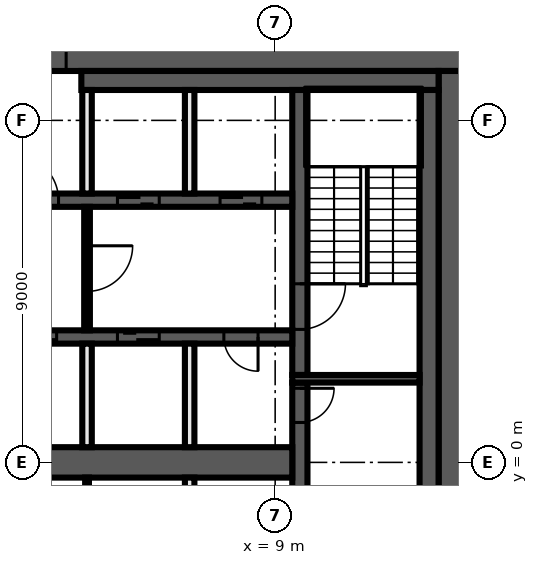
"""IFC4 building model, lengths in metres.
Left out: names, types, materials, properties, quantities, classifications, styles, units other than length and angle.
Written with IfcOpenShell. Run it as: python <this file> out.ifc"""

import sys

from ifc_helpers import new_model, si_unit, direction, frame, frame_2d, origin, place, context, subcontext, project, spatial, rectangle, extrude, element, fill, save


model = new_model("IFC4")
c1 = context("Model", 3, precision=1e-05, world=origin(), true_north=direction((0.0, 1.0)))
c2 = subcontext(c1, "Body", "Model", "MODEL_VIEW")
j1 = project(units=[si_unit("LENGTHUNIT", "METRE"), si_unit("PLANEANGLEUNIT", "RADIAN")], contexts=[c1])
p1 = place(None, origin())
s1 = spatial("IfcSite", under=j1, at=p1, CompositionType="ELEMENT")
p2 = place(p1, origin())
s2 = spatial("IfcBuilding", under=s1, at=p2, CompositionType="ELEMENT")
p3 = place(p2, frame((0.0, 0.0, 228.6)))
s3 = spatial("IfcBuildingStorey", under=s2, at=p3, CompositionType="ELEMENT", Elevation=228.6)
p4 = place(p3, frame((-14.0, 10.65, 0.0), z_axis=(0.0, 0.0, 1.0), x_axis=(1.0, 0.0, 0.0)))
e1 = element("IfcWall", 1, at=p4, inside=s3, PredefinedType="SHEAR", context=c2, shape_type="SweptSolid", body=[
    extrude(rectangle(XDim=28.0, YDim=0.7, at=frame_2d((14.0, 0.0))), origin(), (0.0, 0.0, 1.0), 3.75),
])
p5 = place(p4, frame((15.9, 0.0, 0.0)))
e2 = element("IfcOpeningElement", 2, at=p5, cuts=e1, PredefinedType="OPENING", context=c2, shape_type="SweptSolid", body=[
    extrude(rectangle(XDim=1.6, YDim=2.1, at=frame_2d((0.8, 1.05))), frame((0.0, 0.36, 0.0), z_axis=(0.0, -1.0, 0.0), x_axis=(1.0, 0.0, 0.0)), (0.0, 0.0, 1.0), 0.72),
])
p6 = place(p3, frame((13.65, 10.3, 0.0), z_axis=(0.0, 0.0, 1.0), x_axis=(0.0, -1.0, 0.0)))
e3 = element("IfcWall", 3, at=p6, inside=s3, PredefinedType="SHEAR", context=c2, shape_type="SweptSolid", body=[
    extrude(rectangle(XDim=20.6, YDim=0.7, at=frame_2d((10.3, 0.0))), origin(), (0.0, 0.0, 1.0), 3.75),
])
p7 = place(p3, frame((3.9, 10.05, 0.0), z_axis=(0.0, 0.0, 1.0), x_axis=(1.0, 0.0, 0.0)))
e4 = element("IfcWall", 4, at=p7, inside=s3, PredefinedType="SHEAR", context=c2, shape_type="SweptSolid", body=[
    extrude(rectangle(XDim=9.4, YDim=0.5, at=frame_2d((4.7, 0.0))), origin(), (0.0, 0.0, 1.0), 3.75),
])
p8 = place(p3, frame((13.05, 9.8, 0.0), z_axis=(0.0, 0.0, 1.0), x_axis=(0.0, -1.0, 0.0)))
e5 = element("IfcWall", 5, at=p8, inside=s3, PredefinedType="SHEAR", context=c2, shape_type="SweptSolid", body=[
    extrude(rectangle(XDim=19.6, YDim=0.5, at=frame_2d((9.8, 0.0))), origin(), (0.0, 0.0, 1.0), 3.75),
])
p9 = place(p3, frame((9.65, 2.1, 0.0), z_axis=(0.0, 0.0, 1.0), x_axis=(0.0, -1.0, 0.0)))
e6 = element("IfcWall", 6, at=p9, inside=s3, PredefinedType="SHEAR", context=c2, shape_type="SweptSolid", body=[
    extrude(rectangle(XDim=4.2, YDim=0.4, at=frame_2d((2.1, 0.0))), origin(), (0.0, 0.0, 1.0), 3.75),
])
p10 = place(p9, frame((0.15, 0.0, 0.0)))
e7 = element("IfcOpeningElement", 7, at=p10, cuts=e6, PredefinedType="OPENING", context=c2, shape_type="SweptSolid", body=[
    extrude(rectangle(XDim=0.9, YDim=2.1, at=frame_2d((0.45, 1.05))), frame((0.0, 0.21, 0.0), z_axis=(0.0, -1.0, 0.0), x_axis=(1.0, 0.0, 0.0)), (0.0, 0.0, 1.0), 0.42),
])
p11 = place(p3, frame((9.65, 9.8, 0.0), z_axis=(0.0, 0.0, 1.0), x_axis=(0.0, -1.0, 0.0)))
e8 = element("IfcWall", 8, at=p11, inside=s3, PredefinedType="SHEAR", context=c2, shape_type="SweptSolid", body=[
    extrude(rectangle(XDim=7.5, YDim=0.4, at=frame_2d((3.75, 0.0))), origin(), (0.0, 0.0, 1.0), 3.75),
])
p12 = place(p11, frame((5.1, 0.0, 0.0)))
e9 = element("IfcOpeningElement", 9, at=p12, cuts=e8, PredefinedType="OPENING", context=c2, shape_type="SweptSolid", body=[
    extrude(rectangle(XDim=1.2, YDim=2.1, at=frame_2d((0.6, 1.05))), frame((0.0, 0.21, 0.0), z_axis=(0.0, -1.0, 0.0), x_axis=(1.0, 0.0, 0.0)), (0.0, 0.0, 1.0), 0.42),
])
p13 = place(p3, frame((9.45, 2.2, 0.0), z_axis=(0.0, 0.0, 1.0), x_axis=(1.0, 0.0, 0.0)))
e10 = element("IfcWall", 10, at=p13, inside=s3, PredefinedType="SHEAR", context=c2, shape_type="SweptSolid", body=[
    extrude(rectangle(XDim=3.35, YDim=0.2, at=frame_2d((1.675, 0.0))), origin(), (0.0, 0.0, 1.0), 3.75),
])
p14 = place(p3, frame((-9.45, 6.9, 0.0), z_axis=(0.0, 0.0, 1.0), x_axis=(1.0, 0.0, 0.0)))
e11 = element("IfcWall", 11, at=p14, inside=s3, PredefinedType="SHEAR", context=c2, shape_type="SweptSolid", body=[
    extrude(rectangle(XDim=18.9, YDim=0.35, at=frame_2d((9.45, 0.0))), origin(), (0.0, 0.0, 1.0), 3.75),
])
p15 = place(p14, frame((11.55, 0.0, 0.0)))
e12 = element("IfcOpeningElement", 12, at=p15, cuts=e11, PredefinedType="OPENING", context=c2, shape_type="SweptSolid", body=[
    extrude(rectangle(XDim=1.2, YDim=2.1, at=frame_2d((0.6, 1.05))), frame((0.0, 0.185, 0.0), z_axis=(0.0, -1.0, 0.0), x_axis=(1.0, 0.0, 0.0)), (0.0, 0.0, 1.0), 0.37),
])
p16 = place(p14, frame((14.3, 0.0, 0.0)))
e13 = element("IfcOpeningElement", 13, at=p16, cuts=e11, PredefinedType="OPENING", context=c2, shape_type="SweptSolid", body=[
    extrude(rectangle(XDim=1.1, YDim=2.1, at=frame_2d((0.55, 1.05))), frame((0.0, 0.185, 0.0), z_axis=(0.0, -1.0, 0.0), x_axis=(1.0, 0.0, 0.0)), (0.0, 0.0, 1.0), 0.37),
])
p17 = place(p14, frame((17.0, 0.0, 0.0)))
e14 = element("IfcOpeningElement", 14, at=p17, cuts=e11, PredefinedType="OPENING", context=c2, shape_type="SweptSolid", body=[
    extrude(rectangle(XDim=1.1, YDim=2.1, at=frame_2d((0.55, 1.05))), frame((0.0, 0.185, 0.0), z_axis=(0.0, -1.0, 0.0), x_axis=(1.0, 0.0, 0.0)), (0.0, 0.0, 1.0), 0.37),
])
p18 = place(p14, frame((2.25, 0.0, 0.0)))
e15 = element("IfcOpeningElement", 15, at=p18, cuts=e11, PredefinedType="OPENING", context=c2, shape_type="SweptSolid", body=[
    extrude(rectangle(XDim=0.9, YDim=2.1, at=frame_2d((0.45, 1.05))), frame((0.0, 0.185, 0.0), z_axis=(0.0, -1.0, 0.0), x_axis=(1.0, 0.0, 0.0)), (0.0, 0.0, 1.0), 0.37),
])
p19 = place(p14, frame((7.65, 0.0, 0.0)))
e16 = element("IfcOpeningElement", 16, at=p19, cuts=e11, PredefinedType="OPENING", context=c2, shape_type="SweptSolid", body=[
    extrude(rectangle(XDim=0.9, YDim=2.1, at=frame_2d((0.45, 1.05))), frame((0.0, 0.185, 0.0), z_axis=(0.0, -1.0, 0.0), x_axis=(1.0, 0.0, 0.0)), (0.0, 0.0, 1.0), 0.37),
])
p20 = place(p3, frame((9.45, 3.3, 0.0), z_axis=(0.0, 0.0, 1.0), x_axis=(-1.0, 0.0, 0.0)))
e17 = element("IfcWall", 17, at=p20, inside=s3, PredefinedType="SHEAR", context=c2, shape_type="SweptSolid", body=[
    extrude(rectangle(XDim=18.9, YDim=0.35, at=frame_2d((9.45, 0.0))), origin(), (0.0, 0.0, 1.0), 3.75),
])
p21 = place(p20, frame((6.2, 0.0, 0.0)))
e18 = element("IfcOpeningElement", 18, at=p21, cuts=e17, PredefinedType="OPENING", context=c2, shape_type="SweptSolid", body=[
    extrude(rectangle(XDim=1.1, YDim=2.1, at=frame_2d((0.55, 1.05))), frame((0.0, 0.185, 0.0), z_axis=(0.0, -1.0, 0.0), x_axis=(1.0, 0.0, 0.0)), (0.0, 0.0, 1.0), 0.37),
])
p22 = place(p20, frame((3.5, 0.0, 0.0)))
e19 = element("IfcOpeningElement", 19, at=p22, cuts=e17, PredefinedType="OPENING", context=c2, shape_type="SweptSolid", body=[
    extrude(rectangle(XDim=1.1, YDim=2.1, at=frame_2d((0.55, 1.05))), frame((0.0, 0.185, 0.0), z_axis=(0.0, -1.0, 0.0), x_axis=(1.0, 0.0, 0.0)), (0.0, 0.0, 1.0), 0.37),
])
p23 = place(p20, frame((0.9, 0.0, 0.0)))
e20 = element("IfcOpeningElement", 20, at=p23, cuts=e17, PredefinedType="OPENING", context=c2, shape_type="SweptSolid", body=[
    extrude(rectangle(XDim=0.9, YDim=2.1, at=frame_2d((0.45, 1.05))), frame((0.0, 0.185, 0.0), z_axis=(0.0, -1.0, 0.0), x_axis=(1.0, 0.0, 0.0)), (0.0, 0.0, 1.0), 0.37),
])
p24 = place(p20, frame((17.1, 0.0, 0.0)))
e21 = element("IfcOpeningElement", 21, at=p24, cuts=e17, PredefinedType="OPENING", context=c2, shape_type="SweptSolid", body=[
    extrude(rectangle(XDim=0.9, YDim=2.1, at=frame_2d((0.45, 1.05))), frame((0.0, 0.185, 0.0), z_axis=(0.0, -1.0, 0.0), x_axis=(1.0, 0.0, 0.0)), (0.0, 0.0, 1.0), 0.37),
])
p25 = place(p20, frame((14.4, 0.0, 0.0)))
e22 = element("IfcOpeningElement", 22, at=p25, cuts=e17, PredefinedType="OPENING", context=c2, shape_type="SweptSolid", body=[
    extrude(rectangle(XDim=0.9, YDim=2.1, at=frame_2d((0.45, 1.05))), frame((0.0, 0.185, 0.0), z_axis=(0.0, -1.0, 0.0), x_axis=(1.0, 0.0, 0.0)), (0.0, 0.0, 1.0), 0.37),
])
p26 = place(p20, frame((11.7, 0.0, 0.0)))
e23 = element("IfcOpeningElement", 23, at=p26, cuts=e17, PredefinedType="OPENING", context=c2, shape_type="SweptSolid", body=[
    extrude(rectangle(XDim=0.9, YDim=2.1, at=frame_2d((0.45, 1.05))), frame((0.0, 0.185, 0.0), z_axis=(0.0, -1.0, 0.0), x_axis=(1.0, 0.0, 0.0)), (0.0, 0.0, 1.0), 0.37),
])
p27 = place(p20, frame((9.0, 0.0, 0.0)))
e24 = element("IfcOpeningElement", 24, at=p27, cuts=e17, PredefinedType="OPENING", context=c2, shape_type="SweptSolid", body=[
    extrude(rectangle(XDim=0.9, YDim=2.1, at=frame_2d((0.45, 1.05))), frame((0.0, 0.185, 0.0), z_axis=(0.0, -1.0, 0.0), x_axis=(1.0, 0.0, 0.0)), (0.0, 0.0, 1.0), 0.37),
])
p28 = place(p3, frame((-9.45, 0.0, 0.0), z_axis=(0.0, 0.0, 1.0), x_axis=(1.0, 0.0, 0.0)))
e25 = element("IfcWall", 25, at=p28, inside=s3, PredefinedType="SHEAR", context=c2, shape_type="SweptSolid", body=[
    extrude(rectangle(XDim=18.9, YDim=0.8, at=frame_2d((9.45, 0.0))), origin(), (0.0, 0.0, 1.0), 3.75),
])
for number, where, z_axis, x_axis in (
    (26, (6.75, -3.125, 0.0), (0.0, 0.0, 1.0), (0.0, 1.0, 0.0)),
    (27, (6.75, 0.4, 0.0), (0.0, 0.0, 1.0), (0.0, 1.0, 0.0)),
    (28, (6.75, 7.075, 0.0), (0.0, 0.0, 1.0), (0.0, 1.0, 0.0)),
):
    element("IfcWall", number, at=place(p3, frame(where, z_axis=z_axis, x_axis=x_axis)), inside=s3, PredefinedType="SOLIDWALL", context=c2, shape_type="SweptSolid", body=[
        extrude(rectangle(XDim=2.725, YDim=0.25, at=frame_2d((1.363, 0.0))), origin(), (0.0, 0.0, 1.0), 3.75),
    ])
p29 = place(p3, frame((4.05, 6.725, 0.0), z_axis=(0.0, 0.0, 1.0), x_axis=(0.0, -1.0, 0.0)))
e29 = element("IfcWall", 29, at=p29, inside=s3, PredefinedType="PARTITIONING", context=c2, shape_type="SweptSolid", body=[
    extrude(rectangle(XDim=3.25, YDim=0.15, at=frame_2d((1.625, 0.0))), origin(), (0.0, 0.0, 1.0), 3.75),
])
p30 = place(p29, frame((1.025, 0.0, 0.0)))
e30 = element("IfcOpeningElement", 30, at=p30, cuts=e29, PredefinedType="OPENING", context=c2, shape_type="SweptSolid", body=[
    extrude(rectangle(XDim=1.2, YDim=2.1, at=frame_2d((0.6, 1.05))), frame((0.0, 0.085, 0.0), z_axis=(0.0, -1.0, 0.0), x_axis=(1.0, 0.0, 0.0)), (0.0, 0.0, 1.0), 0.17),
])
p31 = place(p3, frame((4.05, -3.125, 0.0), z_axis=(0.0, 0.0, 1.0), x_axis=(0.0, 1.0, 0.0)))
e31 = element("IfcWall", 31, at=p31, inside=s3, PredefinedType="PARTITIONING", context=c2, shape_type="SweptSolid", body=[
    extrude(rectangle(XDim=2.725, YDim=0.1, at=frame_2d((1.363, 0.0))), origin(), (0.0, 0.0, 1.0), 3.75),
])
for number, where, z_axis, x_axis in (
    (32, (4.05, 0.4, 0.0), (0.0, 0.0, 1.0), (0.0, 1.0, 0.0)),
    (33, (4.05, 7.075, 0.0), (0.0, 0.0, 1.0), (0.0, 1.0, 0.0)),
):
    element("IfcWall", number, at=place(p3, frame(where, z_axis=z_axis, x_axis=x_axis)), inside=s3, PredefinedType="SOLIDWALL", context=c2, shape_type="SweptSolid", body=[
        extrude(rectangle(XDim=2.725, YDim=0.25, at=frame_2d((1.363, 0.0))), origin(), (0.0, 0.0, 1.0), 3.75),
    ])
p32 = place(p10, origin())
e34 = element("IfcDoor", 34, at=p32, inside=s3, OperationType="SINGLE_SWING_RIGHT", PredefinedType="DOOR", context=c2, shape_type="SweptSolid", body=[
    extrude(rectangle(XDim=0.9, YDim=2.1, at=frame_2d((0.45, 1.05))), frame((0.0, 0.025, 0.0), z_axis=(0.0, -1.0, 0.0), x_axis=(1.0, 0.0, 0.0)), (0.0, 0.0, 1.0), 0.05),
])
fill(e7, e34)
p33 = place(p5, origin())
e35 = element("IfcDoor", 35, at=p33, inside=s3, OperationType="DOUBLE_DOOR_SINGLE_SWING", PredefinedType="DOOR", context=c2, shape_type="SweptSolid", body=[
    extrude(rectangle(XDim=1.6, YDim=2.1, at=frame_2d((0.8, 1.05))), frame((0.0, 0.025, 0.0), z_axis=(0.0, -1.0, 0.0), x_axis=(1.0, 0.0, 0.0)), (0.0, 0.0, 1.0), 0.05),
])
fill(e2, e35)
p34 = place(p15, origin())
e36 = element("IfcDoor", 36, at=p34, inside=s3, OperationType="SINGLE_SWING_LEFT", PredefinedType="DOOR", context=c2, shape_type="SweptSolid", body=[
    extrude(rectangle(XDim=1.2, YDim=2.1, at=frame_2d((0.6, 1.05))), frame((0.0, 0.025, 0.0), z_axis=(0.0, -1.0, 0.0), x_axis=(1.0, 0.0, 0.0)), (0.0, 0.0, 1.0), 0.05),
])
fill(e12, e36)
p35 = place(p16, origin())
e37 = element("IfcDoor", 37, at=p35, inside=s3, OperationType="DOUBLE_DOOR_SLIDING", PredefinedType="DOOR", context=c2, shape_type="SweptSolid", body=[
    extrude(rectangle(XDim=1.1, YDim=2.1, at=frame_2d((0.55, 1.05))), frame((0.0, 0.025, 0.0), z_axis=(0.0, -1.0, 0.0), x_axis=(1.0, 0.0, 0.0)), (0.0, 0.0, 1.0), 0.05),
])
fill(e13, e37)
p36 = place(p17, origin())
e38 = element("IfcDoor", 38, at=p36, inside=s3, OperationType="DOUBLE_DOOR_SLIDING", PredefinedType="DOOR", context=c2, shape_type="SweptSolid", body=[
    extrude(rectangle(XDim=1.1, YDim=2.1, at=frame_2d((0.55, 1.05))), frame((0.0, 0.025, 0.0), z_axis=(0.0, -1.0, 0.0), x_axis=(1.0, 0.0, 0.0)), (0.0, 0.0, 1.0), 0.05),
])
fill(e14, e38)
p37 = place(p21, origin())
e39 = element("IfcDoor", 39, at=p37, inside=s3, OperationType="DOUBLE_DOOR_SLIDING", PredefinedType="DOOR", context=c2, shape_type="SweptSolid", body=[
    extrude(rectangle(XDim=1.1, YDim=2.1, at=frame_2d((0.55, 1.05))), frame((0.0, 0.025, 0.0), z_axis=(0.0, -1.0, 0.0), x_axis=(1.0, 0.0, 0.0)), (0.0, 0.0, 1.0), 0.05),
])
fill(e18, e39)
p38 = place(p22, origin())
e40 = element("IfcDoor", 40, at=p38, inside=s3, OperationType="DOUBLE_DOOR_SLIDING", PredefinedType="DOOR", context=c2, shape_type="SweptSolid", body=[
    extrude(rectangle(XDim=1.1, YDim=2.1, at=frame_2d((0.55, 1.05))), frame((0.0, 0.025, 0.0), z_axis=(0.0, -1.0, 0.0), x_axis=(1.0, 0.0, 0.0)), (0.0, 0.0, 1.0), 0.05),
])
fill(e19, e40)
p39 = place(p23, origin())
e41 = element("IfcDoor", 41, at=p39, inside=s3, OperationType="SINGLE_SWING_LEFT", PredefinedType="DOOR", context=c2, shape_type="SweptSolid", body=[
    extrude(rectangle(XDim=0.9, YDim=2.1, at=frame_2d((0.45, 1.05))), frame((0.0, 0.025, 0.0), z_axis=(0.0, -1.0, 0.0), x_axis=(1.0, 0.0, 0.0)), (0.0, 0.0, 1.0), 0.05),
])
fill(e20, e41)
p40 = place(p12, origin())
e42 = element("IfcDoor", 42, at=p40, inside=s3, OperationType="SINGLE_SWING_LEFT", PredefinedType="DOOR", context=c2, shape_type="SweptSolid", body=[
    extrude(rectangle(XDim=1.2, YDim=2.1, at=frame_2d((0.6, 1.05))), frame((0.0, 0.025, 0.0), z_axis=(0.0, -1.0, 0.0), x_axis=(1.0, 0.0, 0.0)), (0.0, 0.0, 1.0), 0.05),
])
fill(e9, e42)
p41 = place(p30, origin())
e43 = element("IfcDoor", 43, at=p41, inside=s3, OperationType="SINGLE_SWING_RIGHT", PredefinedType="DOOR", context=c2, shape_type="SweptSolid", body=[
    extrude(rectangle(XDim=1.2, YDim=2.1, at=frame_2d((0.6, 1.05))), frame((0.0, 0.025, 0.0), z_axis=(0.0, -1.0, 0.0), x_axis=(1.0, 0.0, 0.0)), (0.0, 0.0, 1.0), 0.05),
])
fill(e30, e43)
save(model, sys.argv[1])
